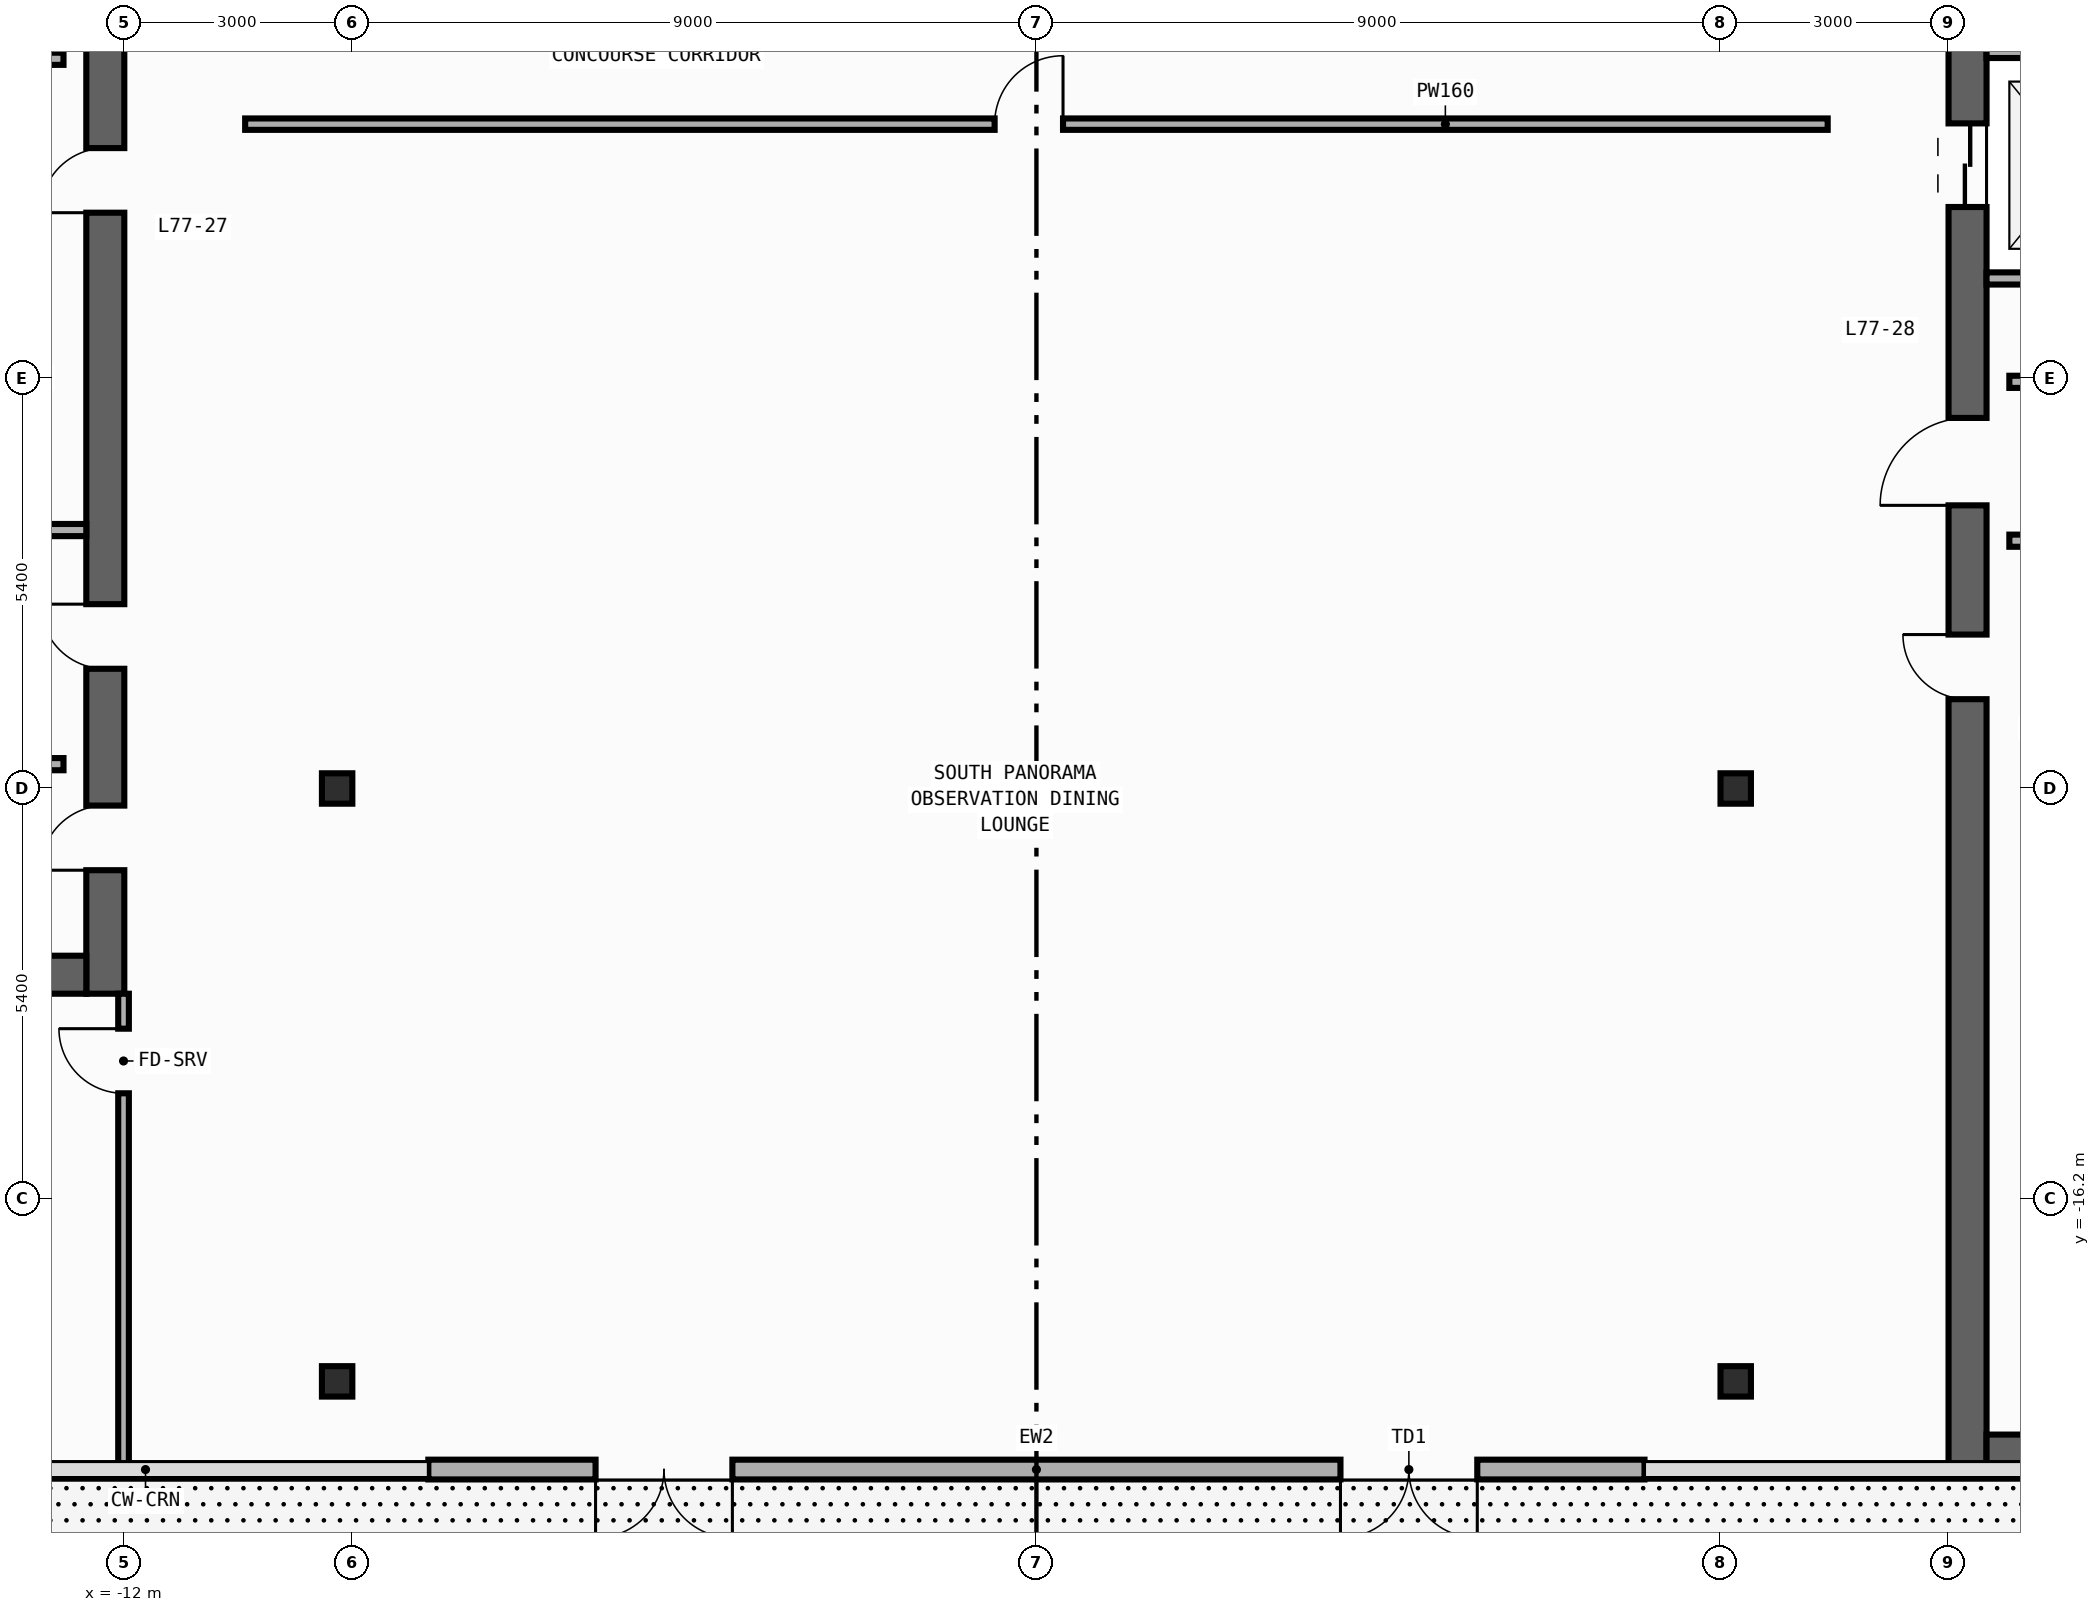
"""IFC4 building model, lengths in metres.
Left out: names, types, materials, properties, quantities, classifications, styles, units other than length and angle.
Written with IfcOpenShell. Run it as: python <this file> out.ifc"""

import sys

from ifc_helpers import new_model, si_unit, direction, frame, frame_2d, origin, origin_2d, place, context, subcontext, project, spatial, rectangle, i_section, extrude, element, fill, save


model = new_model("IFC4")
c1 = context("Model", 3, precision=1e-05, world=origin(), true_north=direction((0.0, 1.0)))
c2 = subcontext(c1, "Body", "Model", "MODEL_VIEW")
j1 = project(units=[si_unit("LENGTHUNIT", "METRE"), si_unit("PLANEANGLEUNIT", "RADIAN")], contexts=[c1])
p1 = place(None, origin())
s1 = spatial("IfcSite", under=j1, at=p1, CompositionType="ELEMENT")
p2 = place(p1, origin())
s2 = spatial("IfcBuilding", under=s1, at=p2, CompositionType="ELEMENT")
p3 = place(p2, frame((0.0, 0.0, 320.4)))
s3 = spatial("IfcBuildingStorey", under=s2, at=p3, CompositionType="ELEMENT", Elevation=320.4)
p4 = place(p3, frame((-12.25, -13.5, 0.0), z_axis=(0.0, 0.0, 1.0), x_axis=(0.0, 1.0, 0.0)))
e1 = element("IfcWall", 1, at=p4, inside=s3, PredefinedType="SHEAR", context=c2, shape_type="SweptSolid", body=[
    extrude(rectangle(XDim=27.0, YDim=0.5, at=frame_2d((13.5, 0.0))), origin(), (0.0, 0.0, 1.0), 4.45),
])
p5 = place(p4, frame((15.175, 0.0, 0.0)))
e2 = element("IfcOpeningElement", 2, at=p5, cuts=e1, PredefinedType="OPENING", context=c2, shape_type="SweptSolid", body=[
    extrude(rectangle(XDim=0.85, YDim=2.1, at=frame_2d((0.425, 1.05))), frame((0.0, 0.26, 0.0), z_axis=(0.0, -1.0, 0.0), x_axis=(1.0, 0.0, 0.0)), (0.0, 0.0, 1.0), 0.52),
])
p6 = place(p4, frame((21.275, 0.0, 0.0)))
e3 = element("IfcOpeningElement", 3, at=p6, cuts=e1, PredefinedType="OPENING", context=c2, shape_type="SweptSolid", body=[
    extrude(rectangle(XDim=0.85, YDim=2.1, at=frame_2d((0.425, 1.05))), frame((0.0, 0.26, 0.0), z_axis=(0.0, -1.0, 0.0), x_axis=(1.0, 0.0, 0.0)), (0.0, 0.0, 1.0), 0.52),
])
p7 = place(p4, frame((4.275, 0.0, 0.0)))
e4 = element("IfcOpeningElement", 4, at=p7, cuts=e1, PredefinedType="OPENING", context=c2, shape_type="SweptSolid", body=[
    extrude(rectangle(XDim=0.85, YDim=2.1, at=frame_2d((0.425, 1.05))), frame((0.0, 0.26, 0.0), z_axis=(0.0, -1.0, 0.0), x_axis=(1.0, 0.0, 0.0)), (0.0, 0.0, 1.0), 0.52),
])
p8 = place(p4, frame((10.275, 0.0, 0.0)))
e5 = element("IfcOpeningElement", 5, at=p8, cuts=e1, PredefinedType="OPENING", context=c2, shape_type="SweptSolid", body=[
    extrude(rectangle(XDim=0.85, YDim=2.1, at=frame_2d((0.425, 1.05))), frame((0.0, 0.26, 0.0), z_axis=(0.0, -1.0, 0.0), x_axis=(1.0, 0.0, 0.0)), (0.0, 0.0, 1.0), 0.52),
])
p9 = place(p4, frame((12.725, 0.0, 0.0)))
e6 = element("IfcOpeningElement", 6, at=p9, cuts=e1, PredefinedType="OPENING", context=c2, shape_type="SweptSolid", body=[
    extrude(rectangle(XDim=1.15, YDim=2.2, at=frame_2d((0.575, 1.1))), frame((0.0, 0.26, 0.0), z_axis=(0.0, -1.0, 0.0), x_axis=(1.0, 0.0, 0.0)), (0.0, 0.0, 1.0), 0.52),
])
p10 = place(p4, frame((1.625, 0.0, 0.0)))
e7 = element("IfcOpeningElement", 7, at=p10, cuts=e1, PredefinedType="OPENING", context=c2, shape_type="SweptSolid", body=[
    extrude(rectangle(XDim=0.85, YDim=2.1, at=frame_2d((0.425, 1.05))), frame((0.0, 0.26, 0.0), z_axis=(0.0, -1.0, 0.0), x_axis=(1.0, 0.0, 0.0)), (0.0, 0.0, 1.0), 0.52),
])
p11 = place(p3, frame((-19.9, -13.25, 0.0), z_axis=(0.0, 0.0, 1.0), x_axis=(1.0, 0.0, 0.0)))
e8 = element("IfcWall", 8, at=p11, inside=s3, PredefinedType="SHEAR", context=c2, shape_type="SweptSolid", body=[
    extrude(rectangle(XDim=7.4, YDim=0.5, at=frame_2d((3.7, 0.0))), origin(), (0.0, 0.0, 1.0), 4.45),
])
p12 = place(p3, frame((12.25, -19.8, 0.0), z_axis=(0.0, 0.0, 1.0), x_axis=(0.0, 1.0, 0.0)))
e9 = element("IfcWall", 9, at=p12, inside=s3, PredefinedType="SHEAR", context=c2, shape_type="SweptSolid", body=[
    extrude(rectangle(XDim=27.0, YDim=0.5, at=frame_2d((13.5, 0.0))), origin(), (0.0, 0.0, 1.0), 4.45),
])
p13 = place(p12, frame((23.05, 0.0, 0.0)))
e10 = element("IfcOpeningElement", 10, at=p13, cuts=e9, PredefinedType="OPENING", context=c2, shape_type="SweptSolid", body=[
    extrude(rectangle(XDim=1.1, YDim=2.2, at=frame_2d((0.55, 1.1))), frame((0.0, 0.26, 0.0), z_axis=(0.0, -1.0, 0.0), x_axis=(1.0, 0.0, 0.0)), (0.0, 0.0, 1.0), 0.52),
])
p14 = place(p12, frame((19.85, 0.0, 0.0)))
e11 = element("IfcOpeningElement", 11, at=p14, cuts=e9, PredefinedType="OPENING", context=c2, shape_type="SweptSolid", body=[
    extrude(rectangle(XDim=1.1, YDim=2.2, at=frame_2d((0.55, 1.1))), frame((0.0, 0.26, 0.0), z_axis=(0.0, -1.0, 0.0), x_axis=(1.0, 0.0, 0.0)), (0.0, 0.0, 1.0), 0.52),
])
p15 = place(p12, frame((16.65, 0.0, 0.0)))
e12 = element("IfcOpeningElement", 12, at=p15, cuts=e9, PredefinedType="OPENING", context=c2, shape_type="SweptSolid", body=[
    extrude(rectangle(XDim=1.1, YDim=2.2, at=frame_2d((0.55, 1.1))), frame((0.0, 0.26, 0.0), z_axis=(0.0, -1.0, 0.0), x_axis=(1.0, 0.0, 0.0)), (0.0, 0.0, 1.0), 0.52),
])
p16 = place(p12, frame((10.175, 0.0, 0.0)))
e13 = element("IfcOpeningElement", 13, at=p16, cuts=e9, PredefinedType="OPENING", context=c2, shape_type="SweptSolid", body=[
    extrude(rectangle(XDim=0.85, YDim=2.1, at=frame_2d((0.425, 1.05))), frame((0.0, 0.26, 0.0), z_axis=(0.0, -1.0, 0.0), x_axis=(1.0, 0.0, 0.0)), (0.0, 0.0, 1.0), 0.52),
])
p17 = place(p12, frame((12.725, 0.0, 0.0)))
e14 = element("IfcOpeningElement", 14, at=p17, cuts=e9, PredefinedType="OPENING", context=c2, shape_type="SweptSolid", body=[
    extrude(rectangle(XDim=1.15, YDim=2.2, at=frame_2d((0.575, 1.1))), frame((0.0, 0.26, 0.0), z_axis=(0.0, -1.0, 0.0), x_axis=(1.0, 0.0, 0.0)), (0.0, 0.0, 1.0), 0.52),
])
p18 = place(p12, frame((25.125, 0.0, 0.0)))
e15 = element("IfcOpeningElement", 15, at=p18, cuts=e9, PredefinedType="OPENING", context=c2, shape_type="SweptSolid", body=[
    extrude(rectangle(XDim=0.85, YDim=2.1, at=frame_2d((0.425, 1.05))), frame((0.0, 0.26, 0.0), z_axis=(0.0, -1.0, 0.0), x_axis=(1.0, 0.0, 0.0)), (0.0, 0.0, 1.0), 0.52),
])
p19 = place(p3, frame((12.5, -19.55, 0.0), z_axis=(0.0, 0.0, 1.0), x_axis=(1.0, 0.0, 0.0)))
e16 = element("IfcWall", 16, at=p19, inside=s3, PredefinedType="SHEAR", context=c2, shape_type="SweptSolid", body=[
    extrude(rectangle(XDim=7.4, YDim=0.5, at=frame_2d((3.7, 0.0))), origin(), (0.0, 0.0, 1.0), 4.45),
])
for number, where, z_axis, x_axis in (
    (17, (-9.2, -18.6, 0.0), (0.0, 0.0, 1.0), (1.0, 0.0, 0.0)),
    (18, (-9.2, -10.8, 0.0), (0.0, 0.0, 1.0), (1.0, 0.0, 0.0)),
    (19, (9.2, -18.6, 0.0), (0.0, 0.0, 1.0), (1.0, 0.0, 0.0)),
    (20, (9.2, -10.8, 0.0), (0.0, 0.0, 1.0), (1.0, 0.0, 0.0)),
):
    element("IfcColumn", number, at=place(p3, frame(where, z_axis=z_axis, x_axis=x_axis)), inside=s3, PredefinedType="COLUMN", context=c2, shape_type="SweptSolid", body=[
        extrude(i_section(OverallWidth=0.4, OverallDepth=0.4, WebThickness=0.013, FlangeThickness=0.021, FilletRadius=0.022, at=origin_2d()), origin(), (0.0, 0.0, 1.0), 4.8),
    ])
p20 = place(p3, frame((8.0, -19.76, 0.0), z_axis=(0.0, 0.0, 1.0), x_axis=(-1.0, 0.0, 0.0)))
e21 = element("IfcWall", 21, at=p20, inside=s3, PredefinedType="STANDARD", context=c2, shape_type="SweptSolid", body=[
    extrude(rectangle(XDim=16.0, YDim=0.26, at=frame_2d((8.0, 0.0))), origin(), (0.0, 0.0, 1.0), 4.45),
])
p21 = place(p20, frame((2.2, 0.0, 0.0)))
e22 = element("IfcOpeningElement", 22, at=p21, cuts=e21, PredefinedType="OPENING", context=c2, shape_type="SweptSolid", body=[
    extrude(rectangle(XDim=1.8, YDim=2.3, at=frame_2d((0.9, 1.15))), frame((0.0, 0.14, 0.0), z_axis=(0.0, -1.0, 0.0), x_axis=(1.0, 0.0, 0.0)), (0.0, 0.0, 1.0), 0.28),
])
p22 = place(p20, frame((12.0, 0.0, 0.0)))
e23 = element("IfcOpeningElement", 23, at=p22, cuts=e21, PredefinedType="OPENING", context=c2, shape_type="SweptSolid", body=[
    extrude(rectangle(XDim=1.8, YDim=2.3, at=frame_2d((0.9, 1.15))), frame((0.0, 0.14, 0.0), z_axis=(0.0, -1.0, 0.0), x_axis=(1.0, 0.0, 0.0)), (0.0, 0.0, 1.0), 0.28),
])
for number, where, z_axis, x_axis in (
    (24, (12.5, -4.09, 0.0), (0.0, 0.0, 1.0), (1.0, 0.0, 0.0)),
    (25, (12.5, -1.11, 0.0), (0.0, 0.0, 1.0), (1.0, 0.0, 0.0)),
):
    element("IfcWall", number, at=place(p3, frame(where, z_axis=z_axis, x_axis=x_axis)), inside=s3, PredefinedType="STANDARD", context=c2, shape_type="SweptSolid", body=[
        extrude(rectangle(XDim=2.49, YDim=0.16, at=frame_2d((1.245, 0.0))), origin(), (0.0, 0.0, 1.0), 4.45),
    ])
for number, where, z_axis, x_axis in (
    (26, (-15.4, -1.2, 0.0), (0.0, 0.0, 1.0), (1.0, 0.0, 0.0)),
    (27, (-15.4, -10.48, 0.0), (0.0, 0.0, 1.0), (1.0, 0.0, 0.0)),
    (28, (12.8, -5.45, 0.0), (0.0, 0.0, 1.0), (1.0, 0.0, 0.0)),
    (29, (12.8, -7.54, 0.0), (0.0, 0.0, 1.0), (1.0, 0.0, 0.0)),
):
    element("IfcWall", number, at=place(p3, frame(where, z_axis=z_axis, x_axis=x_axis)), inside=s3, PredefinedType="STANDARD", context=c2, shape_type="SweptSolid", body=[
        extrude(rectangle(XDim=2.6, YDim=0.16, at=frame_2d((1.3, 0.0))), origin(), (0.0, 0.0, 1.0), 4.45),
    ])
p23 = place(p3, frame((-15.4, -7.4, 0.0), z_axis=(0.0, 0.0, 1.0), x_axis=(1.0, 0.0, 0.0)))
e30 = element("IfcWall", 30, at=p23, inside=s3, PredefinedType="PARTITIONING", context=c2, shape_type="SweptSolid", body=[
    extrude(rectangle(XDim=2.9, YDim=0.16, at=frame_2d((1.45, 0.0))), origin(), (0.0, 0.0, 1.0), 4.45),
])
p24 = place(p3, frame((-10.41, -2.06, 0.0), z_axis=(0.0, 0.0, 1.0), x_axis=(1.0, 0.0, 0.0)))
e31 = element("IfcWall", 31, at=p24, inside=s3, PredefinedType="PARTITIONING", context=c2, shape_type="SweptSolid", body=[
    extrude(rectangle(XDim=20.82, YDim=0.15, at=frame_2d((10.41, 0.0))), origin(), (0.0, 0.0, 1.0), 4.45),
])
p25 = place(p24, frame((9.86, 0.0, 0.0)))
e32 = element("IfcOpeningElement", 32, at=p25, cuts=e31, PredefinedType="OPENING", context=c2, shape_type="SweptSolid", body=[
    extrude(rectangle(XDim=0.9, YDim=2.15, at=frame_2d((0.45, 1.075))), frame((0.0, 0.085, 0.0), z_axis=(0.0, -1.0, 0.0), x_axis=(1.0, 0.0, 0.0)), (0.0, 0.0, 1.0), 0.17),
])
p26 = place(p3, frame((-12.01, -19.755, 0.0), z_axis=(0.0, 0.0, 1.0), x_axis=(0.0, 1.0, 0.0)))
e33 = element("IfcWall", 33, at=p26, inside=s3, PredefinedType="PARTITIONING", context=c2, shape_type="SweptSolid", body=[
    extrude(rectangle(XDim=6.255, YDim=0.14, at=frame_2d((3.127, 0.0))), origin(), (0.0, 0.0, 1.0), 4.45),
])
p27 = place(p26, frame((4.945, 0.0, 0.0)))
e34 = element("IfcOpeningElement", 34, at=p27, cuts=e33, PredefinedType="OPENING", context=c2, shape_type="SweptSolid", body=[
    extrude(rectangle(XDim=0.85, YDim=2.1, at=frame_2d((0.425, 1.05))), frame((0.0, 0.08, 0.0), z_axis=(0.0, -1.0, 0.0), x_axis=(1.0, 0.0, 0.0)), (0.0, 0.0, 1.0), 0.16),
])
p28 = place(p21, origin())
e35 = element("IfcDoor", 35, at=p28, inside=s3, OperationType="DOUBLE_DOOR_SINGLE_SWING", PredefinedType="DOOR", context=c2, shape_type="SweptSolid", body=[
    extrude(rectangle(XDim=1.8, YDim=2.3, at=frame_2d((0.9, 1.15))), frame((0.0, 0.025, 0.0), z_axis=(0.0, -1.0, 0.0), x_axis=(1.0, 0.0, 0.0)), (0.0, 0.0, 1.0), 0.05),
])
fill(e22, e35)
p29 = place(p22, origin())
e36 = element("IfcDoor", 36, at=p29, inside=s3, OperationType="DOUBLE_DOOR_SINGLE_SWING", PredefinedType="DOOR", context=c2, shape_type="SweptSolid", body=[
    extrude(rectangle(XDim=1.8, YDim=2.3, at=frame_2d((0.9, 1.15))), frame((0.0, 0.025, 0.0), z_axis=(0.0, -1.0, 0.0), x_axis=(1.0, 0.0, 0.0)), (0.0, 0.0, 1.0), 0.05),
])
fill(e23, e36)
p30 = place(p15, origin())
e37 = element("IfcDoor", 37, at=p30, inside=s3, OperationType="DOUBLE_DOOR_SLIDING", PredefinedType="DOOR", context=c2, shape_type="SweptSolid", body=[
    extrude(rectangle(XDim=1.1, YDim=2.2, at=frame_2d((0.55, 1.1))), frame((0.0, 0.025, 0.0), z_axis=(0.0, -1.0, 0.0), x_axis=(1.0, 0.0, 0.0)), (0.0, 0.0, 1.0), 0.05),
])
fill(e12, e37)
p31 = place(p7, origin())
e38 = element("IfcDoor", 38, at=p31, inside=s3, OperationType="SINGLE_SWING_RIGHT", PredefinedType="DOOR", context=c2, shape_type="SweptSolid", body=[
    extrude(rectangle(XDim=0.85, YDim=2.1, at=frame_2d((0.425, 1.05))), frame((0.0, 0.025, 0.0), z_axis=(0.0, -1.0, 0.0), x_axis=(1.0, 0.0, 0.0)), (0.0, 0.0, 1.0), 0.05),
])
fill(e4, e38)
p32 = place(p8, origin())
e39 = element("IfcDoor", 39, at=p32, inside=s3, OperationType="SINGLE_SWING_LEFT", PredefinedType="DOOR", context=c2, shape_type="SweptSolid", body=[
    extrude(rectangle(XDim=0.85, YDim=2.1, at=frame_2d((0.425, 1.05))), frame((0.0, 0.025, 0.0), z_axis=(0.0, -1.0, 0.0), x_axis=(1.0, 0.0, 0.0)), (0.0, 0.0, 1.0), 0.05),
])
fill(e5, e39)
p33 = place(p16, origin())
e40 = element("IfcDoor", 40, at=p33, inside=s3, OperationType="SINGLE_SWING_RIGHT", PredefinedType="DOOR", context=c2, shape_type="SweptSolid", body=[
    extrude(rectangle(XDim=0.85, YDim=2.1, at=frame_2d((0.425, 1.05))), frame((0.0, 0.025, 0.0), z_axis=(0.0, -1.0, 0.0), x_axis=(1.0, 0.0, 0.0)), (0.0, 0.0, 1.0), 0.05),
])
fill(e13, e40)
p34 = place(p10, origin())
e41 = element("IfcDoor", 41, at=p34, inside=s3, OperationType="SINGLE_SWING_LEFT", PredefinedType="DOOR", context=c2, shape_type="SweptSolid", body=[
    extrude(rectangle(XDim=0.85, YDim=2.1, at=frame_2d((0.425, 1.05))), frame((0.0, 0.025, 0.0), z_axis=(0.0, -1.0, 0.0), x_axis=(1.0, 0.0, 0.0)), (0.0, 0.0, 1.0), 0.05),
])
fill(e7, e41)
p35 = place(p17, origin())
e42 = element("IfcDoor", 42, at=p35, inside=s3, OperationType="SINGLE_SWING_LEFT", PredefinedType="DOOR", context=c2, shape_type="SweptSolid", body=[
    extrude(rectangle(XDim=1.15, YDim=2.2, at=frame_2d((0.575, 1.1))), frame((0.0, 0.025, 0.0), z_axis=(0.0, -1.0, 0.0), x_axis=(1.0, 0.0, 0.0)), (0.0, 0.0, 1.0), 0.05),
])
fill(e14, e42)
p36 = place(p25, origin())
e43 = element("IfcDoor", 43, at=p36, inside=s3, OperationType="SINGLE_SWING_RIGHT", PredefinedType="DOOR", context=c2, shape_type="SweptSolid", body=[
    extrude(rectangle(XDim=0.9, YDim=2.15, at=frame_2d((0.45, 1.075))), frame((0.0, 0.025, 0.0), z_axis=(0.0, -1.0, 0.0), x_axis=(1.0, 0.0, 0.0)), (0.0, 0.0, 1.0), 0.05),
])
fill(e32, e43)
p37 = place(p27, origin())
e44 = element("IfcDoor", 44, at=p37, inside=s3, OperationType="SINGLE_SWING_RIGHT", PredefinedType="DOOR", context=c2, shape_type="SweptSolid", body=[
    extrude(rectangle(XDim=0.85, YDim=2.1, at=frame_2d((0.425, 1.05))), frame((0.0, 0.025, 0.0), z_axis=(0.0, -1.0, 0.0), x_axis=(1.0, 0.0, 0.0)), (0.0, 0.0, 1.0), 0.05),
])
fill(e34, e44)
save(model, sys.argv[1])
